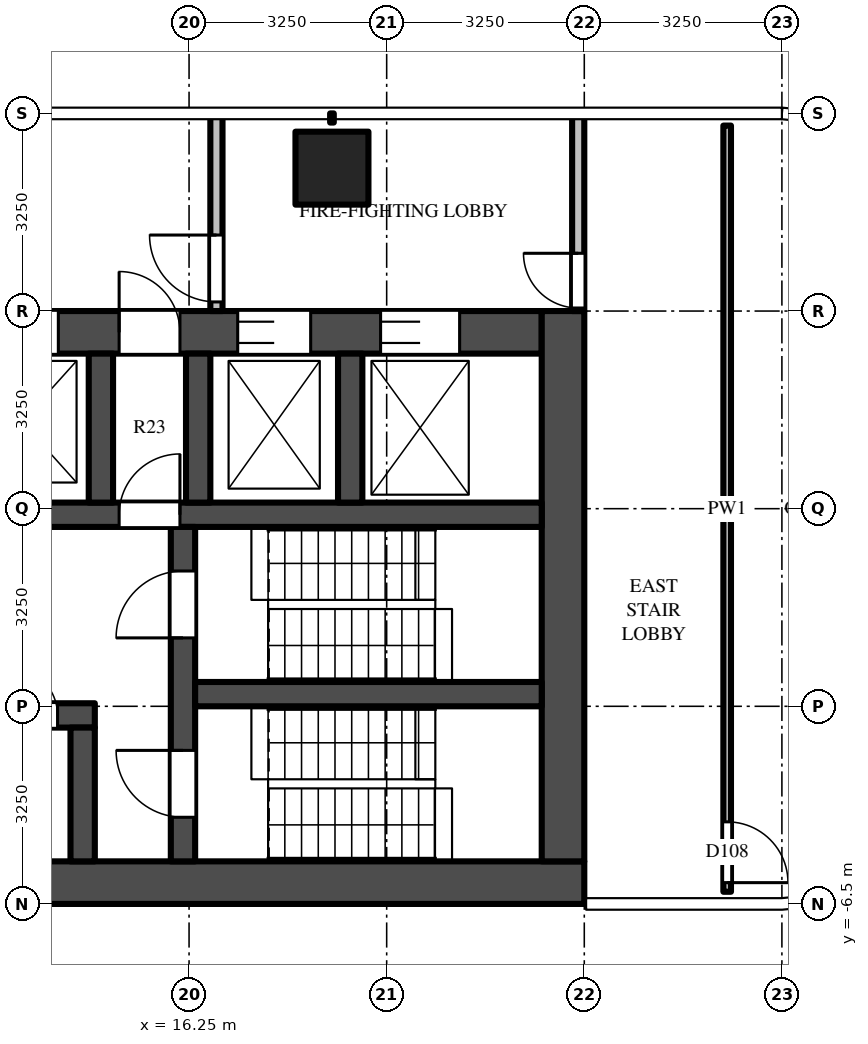
"""IFC4 building model, lengths in metres.
Left out: names, types, materials, properties, quantities, classifications, styles, units other than length and angle.
Written with IfcOpenShell. Run it as: python <this file> out.ifc"""

import sys

from ifc_helpers import new_model, si_unit, direction, frame, frame_2d, origin, origin_2d, place, context, subcontext, project, spatial, rectangle, extrude, source, transform, mapped, element, fill, save


model = new_model("IFC4")
c1 = context("Model", 3, precision=1e-05, world=origin(), true_north=direction((0.0, 1.0)))
c2 = subcontext(c1, "Body", "Model", "MODEL_VIEW")
j1 = project(units=[si_unit("LENGTHUNIT", "METRE"), si_unit("PLANEANGLEUNIT", "RADIAN")], contexts=[c1])
p1 = place(None, origin())
s1 = spatial("IfcSite", under=j1, at=p1, CompositionType="ELEMENT")
p2 = place(p1, origin())
s2 = spatial("IfcBuilding", under=s1, at=p2, CompositionType="ELEMENT")
p3 = place(p2, frame((0.0, 0.0, 177.6)))
s3 = spatial("IfcBuildingStorey", under=s2, at=p3, CompositionType="ELEMENT", Elevation=177.6)
m1 = source(origin(), c2, "Body", "SweptSolid", [
    extrude(rectangle(XDim=1.2, YDim=1.2, at=origin_2d()), origin(), (0.0, 0.0, 1.0), 3.9),
])
p4 = place(p3, frame((18.6, 5.6, 0.0), z_axis=(0.0, 0.0, 1.0), x_axis=(1.0, 0.0, 0.0)))
e1 = element("IfcColumn", 1, at=p4, inside=s3, PredefinedType="COLUMN", context=c2, shape_type="MappedRepresentation", body=[
    mapped(m1, transform((0.0, 0.0, 0.0))),
])
m2 = source(origin(), c2, "Body", "SweptSolid", [
    extrude(rectangle(XDim=16.55, YDim=0.7, at=frame_2d((8.275, 0.0))), origin(), (0.0, 0.0, 1.0), 3.7),
])
p5 = place(p3, frame((6.2, -6.15, 0.0), z_axis=(0.0, 0.0, 1.0), x_axis=(1.0, 0.0, 0.0)))
e2 = element("IfcWall", 2, at=p5, inside=s3, PredefinedType="SHEAR", context=c2, shape_type="MappedRepresentation", body=[
    mapped(m2, transform((0.0, 0.0, 0.0))),
])
m3 = source(origin(), c2, "Body", "SweptSolid", [
    extrude(rectangle(XDim=14.85, YDim=0.7, at=frame_2d((7.425, 0.0))), origin(), (0.0, 0.0, 1.0), 3.7),
])
p6 = place(p3, frame((7.2, 2.9, 0.0), z_axis=(0.0, 0.0, 1.0), x_axis=(1.0, 0.0, 0.0)))
e3 = element("IfcWall", 3, at=p6, inside=s3, PredefinedType="SHEAR", context=c2, shape_type="MappedRepresentation", body=[
    mapped(m3, transform((0.0, 0.0, 0.0))),
])
m4 = source(origin(), c2, "Body", "SweptSolid", [
    extrude(rectangle(XDim=1.1, YDim=2.1, at=frame_2d((0.55, 1.05))), frame((0.0, 0.36, 0.0), z_axis=(0.0, -1.0, 0.0), x_axis=(1.0, 0.0, 0.0)), (0.0, 0.0, 1.0), 0.72),
])
p7 = place(p6, frame((0.55, 0.0, 0.0)))
e4 = element("IfcOpeningElement", 4, at=p7, cuts=e3, PredefinedType="OPENING", context=c2, shape_type="MappedRepresentation", body=[
    mapped(m4, transform((0.0, 0.0, 0.0))),
])
p8 = place(p6, frame((3.15, 0.0, 0.0)))
e5 = element("IfcOpeningElement", 5, at=p8, cuts=e3, PredefinedType="OPENING", context=c2, shape_type="MappedRepresentation", body=[
    mapped(m4, transform((0.0, 0.0, 0.0))),
])
m5 = source(origin(), c2, "Body", "SweptSolid", [
    extrude(rectangle(XDim=1.2, YDim=2.1, at=frame_2d((0.6, 1.05))), frame((0.0, 0.36, 0.0), z_axis=(0.0, -1.0, 0.0), x_axis=(1.0, 0.0, 0.0)), (0.0, 0.0, 1.0), 0.72),
])
p9 = place(p6, frame((5.7, 0.0, 0.0)))
e6 = element("IfcOpeningElement", 6, at=p9, cuts=e3, PredefinedType="OPENING", context=c2, shape_type="MappedRepresentation", body=[
    mapped(m5, transform((0.0, 0.0, 0.0))),
])
m6 = source(origin(), c2, "Body", "SweptSolid", [
    extrude(rectangle(XDim=1.3, YDim=2.1, at=frame_2d((0.65, 1.05))), frame((0.0, 0.36, 0.0), z_axis=(0.0, -1.0, 0.0), x_axis=(1.0, 0.0, 0.0)), (0.0, 0.0, 1.0), 0.72),
])
p10 = place(p6, frame((12.2, 0.0, 0.0)))
e7 = element("IfcOpeningElement", 7, at=p10, cuts=e3, PredefinedType="OPENING", context=c2, shape_type="MappedRepresentation", body=[
    mapped(m6, transform((0.0, 0.0, 0.0))),
])
p11 = place(p6, frame((9.85, 0.0, 0.0)))
e8 = element("IfcOpeningElement", 8, at=p11, cuts=e3, PredefinedType="OPENING", context=c2, shape_type="MappedRepresentation", body=[
    mapped(m5, transform((0.0, 0.0, 0.0))),
])
m7 = source(origin(), c2, "Body", "SweptSolid", [
    extrude(rectangle(XDim=1.0, YDim=2.1, at=frame_2d((0.5, 1.05))), frame((0.0, 0.36, 0.0), z_axis=(0.0, -1.0, 0.0), x_axis=(1.0, 0.0, 0.0)), (0.0, 0.0, 1.0), 0.72),
])
p12 = place(p6, frame((7.9, 0.0, 0.0)))
e9 = element("IfcOpeningElement", 9, at=p12, cuts=e3, PredefinedType="OPENING", context=c2, shape_type="MappedRepresentation", body=[
    mapped(m7, transform((0.0, 0.0, 0.0))),
])
m8 = source(origin(), c2, "Body", "SweptSolid", [
    extrude(rectangle(XDim=9.05, YDim=0.7, at=frame_2d((4.525, 0.0))), origin(), (0.0, 0.0, 1.0), 3.7),
])
p13 = place(p3, frame((22.4, -5.8, 0.0), z_axis=(0.0, 0.0, 1.0), x_axis=(0.0, 1.0, 0.0)))
e10 = element("IfcWall", 10, at=p13, inside=s3, PredefinedType="SHEAR", context=c2, shape_type="MappedRepresentation", body=[
    mapped(m8, transform((0.0, 0.0, 0.0))),
])
m9 = source(origin(), c2, "Body", "SweptSolid", [
    extrude(rectangle(XDim=7.5, YDim=0.4, at=frame_2d((3.75, 0.0))), origin(), (0.0, 0.0, 1.0), 3.7),
])
p14 = place(p3, frame((7.2, -3.4, 0.0), z_axis=(0.0, 0.0, 1.0), x_axis=(1.0, 0.0, 0.0)))
e11 = element("IfcWall", 11, at=p14, inside=s3, PredefinedType="SHEAR", context=c2, shape_type="MappedRepresentation", body=[
    mapped(m9, transform((0.0, 0.0, 0.0))),
])
m10 = source(origin(), c2, "Body", "SweptSolid", [
    extrude(rectangle(XDim=1.0, YDim=2.1, at=frame_2d((0.5, 1.05))), frame((0.0, 0.21, 0.0), z_axis=(0.0, -1.0, 0.0), x_axis=(1.0, 0.0, 0.0)), (0.0, 0.0, 1.0), 0.42),
])
p15 = place(p14, frame((1.462, 0.0, 0.0)))
e12 = element("IfcOpeningElement", 12, at=p15, cuts=e11, PredefinedType="OPENING", context=c2, shape_type="MappedRepresentation", body=[
    mapped(m10, transform((0.0, 0.0, 0.0))),
])
m11 = source(origin(), c2, "Body", "SweptSolid", [
    extrude(rectangle(XDim=0.9, YDim=2.1, at=frame_2d((0.45, 1.05))), frame((0.0, 0.21, 0.0), z_axis=(0.0, -1.0, 0.0), x_axis=(1.0, 0.0, 0.0)), (0.0, 0.0, 1.0), 0.42),
])
p16 = place(p14, frame((4.45, 0.0, 0.0)))
e13 = element("IfcOpeningElement", 13, at=p16, cuts=e11, PredefinedType="OPENING", context=c2, shape_type="MappedRepresentation", body=[
    mapped(m11, transform((0.0, 0.0, 0.0))),
])
m12 = source(origin(), c2, "Body", "SweptSolid", [
    extrude(rectangle(XDim=0.8, YDim=2.1, at=frame_2d((0.4, 1.05))), frame((0.0, 0.21, 0.0), z_axis=(0.0, -1.0, 0.0), x_axis=(1.0, 0.0, 0.0)), (0.0, 0.0, 1.0), 0.42),
])
p17 = place(p14, frame((6.087, 0.0, 0.0)))
e14 = element("IfcOpeningElement", 14, at=p17, cuts=e11, PredefinedType="OPENING", context=c2, shape_type="MappedRepresentation", body=[
    mapped(m12, transform((0.0, 0.0, 0.0))),
])
m13 = source(origin(), c2, "Body", "SweptSolid", [
    extrude(rectangle(XDim=14.85, YDim=0.4, at=frame_2d((7.425, 0.0))), origin(), (0.0, 0.0, 1.0), 3.7),
])
p18 = place(p3, frame((7.2, -0.1, 0.0), z_axis=(0.0, 0.0, 1.0), x_axis=(1.0, 0.0, 0.0)))
e15 = element("IfcWall", 15, at=p18, inside=s3, PredefinedType="SHEAR", context=c2, shape_type="MappedRepresentation", body=[
    mapped(m13, transform((0.0, 0.0, 0.0))),
])
p19 = place(p18, frame((7.9, 0.0, 0.0)))
e16 = element("IfcOpeningElement", 16, at=p19, cuts=e15, PredefinedType="OPENING", context=c2, shape_type="MappedRepresentation", body=[
    mapped(m10, transform((0.0, 0.0, 0.0))),
])
m14 = source(origin(), c2, "Body", "SweptSolid", [
    extrude(rectangle(XDim=5.5, YDim=0.4, at=frame_2d((2.75, 0.0))), origin(), (0.0, 0.0, 1.0), 3.7),
])
p20 = place(p3, frame((16.15, -5.8, 0.0), z_axis=(0.0, 0.0, 1.0), x_axis=(0.0, 1.0, 0.0)))
e17 = element("IfcWall", 17, at=p20, inside=s3, PredefinedType="SHEAR", context=c2, shape_type="MappedRepresentation", body=[
    mapped(m14, transform((0.0, 0.0, 0.0))),
])
m15 = source(origin(), c2, "Body", "SweptSolid", [
    extrude(rectangle(XDim=1.1, YDim=2.1, at=frame_2d((0.55, 1.05))), frame((0.0, 0.21, 0.0), z_axis=(0.0, -1.0, 0.0), x_axis=(1.0, 0.0, 0.0)), (0.0, 0.0, 1.0), 0.42),
])
p21 = place(p20, frame((0.725, 0.0, 0.0)))
e18 = element("IfcOpeningElement", 18, at=p21, cuts=e17, PredefinedType="OPENING", context=c2, shape_type="MappedRepresentation", body=[
    mapped(m15, transform((0.0, 0.0, 0.0))),
])
p22 = place(p20, frame((3.675, 0.0, 0.0)))
e19 = element("IfcOpeningElement", 19, at=p22, cuts=e17, PredefinedType="OPENING", context=c2, shape_type="MappedRepresentation", body=[
    mapped(m15, transform((0.0, 0.0, 0.0))),
])
m16 = source(origin(), c2, "Body", "SweptSolid", [
    extrude(rectangle(XDim=5.7, YDim=0.4, at=frame_2d((2.85, 0.0))), origin(), (0.0, 0.0, 1.0), 3.7),
])
p23 = place(p3, frame((16.35, -3.05, 0.0), z_axis=(0.0, 0.0, 1.0), x_axis=(1.0, 0.0, 0.0)))
e20 = element("IfcWall", 20, at=p23, inside=s3, PredefinedType="SHEAR", context=c2, shape_type="MappedRepresentation", body=[
    mapped(m16, transform((0.0, 0.0, 0.0))),
])
m17 = source(origin(), c2, "Body", "SweptSolid", [
    extrude(rectangle(XDim=2.2, YDim=0.4, at=frame_2d((1.1, 0.0))), origin(), (0.0, 0.0, 1.0), 3.7),
])
p24 = place(p3, frame((14.5, -5.8, 0.0), z_axis=(0.0, 0.0, 1.0), x_axis=(0.0, 1.0, 0.0)))
e21 = element("IfcWall", 21, at=p24, inside=s3, PredefinedType="SHEAR", context=c2, shape_type="MappedRepresentation", body=[
    mapped(m17, transform((0.0, 0.0, 0.0))),
])
m18 = source(origin(), c2, "Body", "SweptSolid", [
    extrude(rectangle(XDim=2.45, YDim=0.4, at=frame_2d((1.225, 0.0))), origin(), (0.0, 0.0, 1.0), 3.7),
])
for number, where, z_axis, x_axis in (
    (22, (14.8, 0.1, 0.0), (0.0, 0.0, 1.0), (0.0, 1.0, 0.0)),
    (23, (16.4, 0.1, 0.0), (0.0, 0.0, 1.0), (0.0, 1.0, 0.0)),
    (24, (18.9, 0.1, 0.0), (0.0, 0.0, 1.0), (0.0, 1.0, 0.0)),
):
    element("IfcWall", number, at=place(p3, frame(where, z_axis=z_axis, x_axis=x_axis)), inside=s3, PredefinedType="SHEAR", context=c2, shape_type="MappedRepresentation", body=[
        mapped(m18, transform((0.0, 0.0, 0.0))),
    ])
m19 = source(origin(), c2, "Body", "SweptSolid", [
    extrude(rectangle(XDim=3.25, YDim=0.2, at=frame_2d((1.625, 0.0))), origin(), (0.0, 0.0, 1.0), 3.7),
])
p25 = place(p3, frame((16.7, 3.25, 0.0), z_axis=(0.0, 0.0, 1.0), x_axis=(0.0, 1.0, 0.0)))
e25 = element("IfcWall", 25, at=p25, inside=s3, PredefinedType="PARTITIONING", context=c2, shape_type="MappedRepresentation", body=[
    mapped(m19, transform((0.0, 0.0, 0.0))),
])
m20 = source(origin(), c2, "Body", "SweptSolid", [
    extrude(rectangle(XDim=1.1, YDim=2.1, at=frame_2d((0.55, 1.05))), frame((0.0, 0.11, 0.0), z_axis=(0.0, -1.0, 0.0), x_axis=(1.0, 0.0, 0.0)), (0.0, 0.0, 1.0), 0.22),
])
p26 = place(p25, frame((0.15, 0.0, 0.0)))
e26 = element("IfcOpeningElement", 26, at=p26, cuts=e25, PredefinedType="OPENING", context=c2, shape_type="MappedRepresentation", body=[
    mapped(m20, transform((0.0, 0.0, 0.0))),
])
p27 = place(p3, frame((22.65, 3.25, 0.0), z_axis=(0.0, 0.0, 1.0), x_axis=(0.0, 1.0, 0.0)))
e27 = element("IfcWall", 27, at=p27, inside=s3, PredefinedType="PARTITIONING", context=c2, shape_type="MappedRepresentation", body=[
    mapped(m19, transform((0.0, 0.0, 0.0))),
])
m21 = source(origin(), c2, "Body", "SweptSolid", [
    extrude(rectangle(XDim=0.9, YDim=2.1, at=frame_2d((0.45, 1.05))), frame((0.0, 0.11, 0.0), z_axis=(0.0, -1.0, 0.0), x_axis=(1.0, 0.0, 0.0)), (0.0, 0.0, 1.0), 0.22),
])
p28 = place(p27, frame((0.05, 0.0, 0.0)))
e28 = element("IfcOpeningElement", 28, at=p28, cuts=e27, PredefinedType="OPENING", context=c2, shape_type="MappedRepresentation", body=[
    mapped(m21, transform((0.0, 0.0, 0.0))),
])
m22 = source(origin(), c2, "Body", "SweptSolid", [
    extrude(rectangle(XDim=12.6, YDim=0.125, at=frame_2d((6.3, 0.0))), origin(), (0.0, 0.0, 1.0), 2.78),
])
p29 = place(p3, frame((25.1, 6.3, 0.0), z_axis=(0.0, 0.0, 1.0), x_axis=(0.0, -1.0, 0.0)))
e29 = element("IfcWall", 29, at=p29, inside=s3, PredefinedType="PARTITIONING", context=c2, shape_type="MappedRepresentation", body=[
    mapped(m22, transform((0.0, 0.0, 0.0))),
])
m23 = source(origin(), c2, "Body", "SweptSolid", [
    extrude(rectangle(XDim=1.0, YDim=2.1, at=frame_2d((0.5, 1.05))), frame((0.0, 0.073, 0.0), z_axis=(0.0, -1.0, 0.0), x_axis=(1.0, 0.0, 0.0)), (0.0, 0.0, 1.0), 0.145),
])
p30 = place(p29, frame((11.45, 0.0, 0.0)))
e30 = element("IfcOpeningElement", 30, at=p30, cuts=e29, PredefinedType="OPENING", context=c2, shape_type="MappedRepresentation", body=[
    mapped(m23, transform((0.0, 0.0, 0.0))),
])
m24 = source(origin(), c2, "Body", "SweptSolid", [
    extrude(rectangle(XDim=1.2, YDim=2.1, at=frame_2d((0.6, 1.05))), frame((0.0, -0.275, 0.0), z_axis=(0.0, -1.0, 0.0), x_axis=(1.0, 0.0, 0.0)), (0.0, 0.0, 1.0), 0.05),
])
p31 = place(p9, origin())
e31 = element("IfcDoor", 31, at=p31, inside=s3, OperationType="DOUBLE_DOOR_SLIDING", PredefinedType="DOOR", context=c2, shape_type="MappedRepresentation", body=[
    mapped(m24, transform((0.0, 0.0, 0.0))),
])
fill(e6, e31)
m25 = source(origin(), c2, "Body", "SweptSolid", [
    extrude(rectangle(XDim=1.3, YDim=2.1, at=frame_2d((0.65, 1.05))), frame((0.0, -0.275, 0.0), z_axis=(0.0, -1.0, 0.0), x_axis=(1.0, 0.0, 0.0)), (0.0, 0.0, 1.0), 0.05),
])
p32 = place(p10, origin())
e32 = element("IfcDoor", 32, at=p32, inside=s3, OperationType="DOUBLE_DOOR_SLIDING", PredefinedType="DOOR", context=c2, shape_type="MappedRepresentation", body=[
    mapped(m25, transform((0.0, 0.0, 0.0))),
])
fill(e7, e32)
p33 = place(p11, origin())
e33 = element("IfcDoor", 33, at=p33, inside=s3, OperationType="DOUBLE_DOOR_SLIDING", PredefinedType="DOOR", context=c2, shape_type="MappedRepresentation", body=[
    mapped(m24, transform((0.0, 0.0, 0.0))),
])
fill(e8, e33)
m26 = source(origin(), c2, "Body", "SweptSolid", [
    extrude(rectangle(XDim=1.1, YDim=2.1, at=frame_2d((0.55, 1.05))), frame((0.0, 0.025, 0.0), z_axis=(0.0, -1.0, 0.0), x_axis=(1.0, 0.0, 0.0)), (0.0, 0.0, 1.0), 0.05),
])
p34 = place(p21, origin())
e34 = element("IfcDoor", 34, at=p34, inside=s3, OperationType="SINGLE_SWING_RIGHT", PredefinedType="DOOR", context=c2, shape_type="MappedRepresentation", body=[
    mapped(m26, transform((0.0, 0.0, 0.0))),
])
fill(e18, e34)
p35 = place(p22, origin())
e35 = element("IfcDoor", 35, at=p35, inside=s3, OperationType="SINGLE_SWING_LEFT", PredefinedType="DOOR", context=c2, shape_type="MappedRepresentation", body=[
    mapped(m26, transform((0.0, 0.0, 0.0))),
])
fill(e19, e35)
m27 = source(origin(), c2, "Body", "SweptSolid", [
    extrude(rectangle(XDim=1.0, YDim=2.1, at=frame_2d((0.5, 1.05))), frame((0.0, 0.025, 0.0), z_axis=(0.0, -1.0, 0.0), x_axis=(1.0, 0.0, 0.0)), (0.0, 0.0, 1.0), 0.05),
])
p36 = place(p19, origin())
e36 = element("IfcDoor", 36, at=p36, inside=s3, OperationType="SINGLE_SWING_RIGHT", PredefinedType="DOOR", context=c2, shape_type="MappedRepresentation", body=[
    mapped(m27, transform((0.0, 0.0, 0.0))),
])
fill(e16, e36)
m28 = source(origin(), c2, "Body", "SweptSolid", [
    extrude(rectangle(XDim=1.0, YDim=2.1, at=frame_2d((0.5, 1.05))), frame((0.0, -0.275, 0.0), z_axis=(0.0, -1.0, 0.0), x_axis=(1.0, 0.0, 0.0)), (0.0, 0.0, 1.0), 0.05),
])
p37 = place(p12, origin())
e37 = element("IfcDoor", 37, at=p37, inside=s3, OperationType="SINGLE_SWING_LEFT", PredefinedType="DOOR", context=c2, shape_type="MappedRepresentation", body=[
    mapped(m28, transform((0.0, 0.0, 0.0))),
])
fill(e9, e37)
p38 = place(p26, origin())
e38 = element("IfcDoor", 38, at=p38, inside=s3, OperationType="SINGLE_SWING_RIGHT", PredefinedType="DOOR", context=c2, shape_type="MappedRepresentation", body=[
    mapped(m26, transform((0.0, 0.0, 0.0))),
])
fill(e26, e38)
m29 = source(origin(), c2, "Body", "SweptSolid", [
    extrude(rectangle(XDim=0.9, YDim=2.1, at=frame_2d((0.45, 1.05))), frame((0.0, 0.025, 0.0), z_axis=(0.0, -1.0, 0.0), x_axis=(1.0, 0.0, 0.0)), (0.0, 0.0, 1.0), 0.05),
])
p39 = place(p28, origin())
e39 = element("IfcDoor", 39, at=p39, inside=s3, OperationType="SINGLE_SWING_RIGHT", PredefinedType="DOOR", context=c2, shape_type="MappedRepresentation", body=[
    mapped(m29, transform((0.0, 0.0, 0.0))),
])
fill(e28, e39)
m30 = source(origin(), c2, "Body", "SweptSolid", [
    extrude(rectangle(XDim=0.8, YDim=2.1, at=frame_2d((0.4, 1.05))), frame((0.0, 0.025, 0.0), z_axis=(0.0, -1.0, 0.0), x_axis=(1.0, 0.0, 0.0)), (0.0, 0.0, 1.0), 0.05),
])
p40 = place(p17, origin())
e40 = element("IfcDoor", 40, at=p40, inside=s3, OperationType="SINGLE_SWING_LEFT", PredefinedType="DOOR", context=c2, shape_type="MappedRepresentation", body=[
    mapped(m30, transform((0.0, 0.0, 0.0))),
])
fill(e14, e40)
p41 = place(p30, origin())
e41 = element("IfcDoor", 41, at=p41, inside=s3, OperationType="SINGLE_SWING_RIGHT", PredefinedType="DOOR", context=c2, shape_type="MappedRepresentation", body=[
    mapped(m27, transform((0.0, 0.0, 0.0))),
])
fill(e30, e41)
save(model, sys.argv[1])
